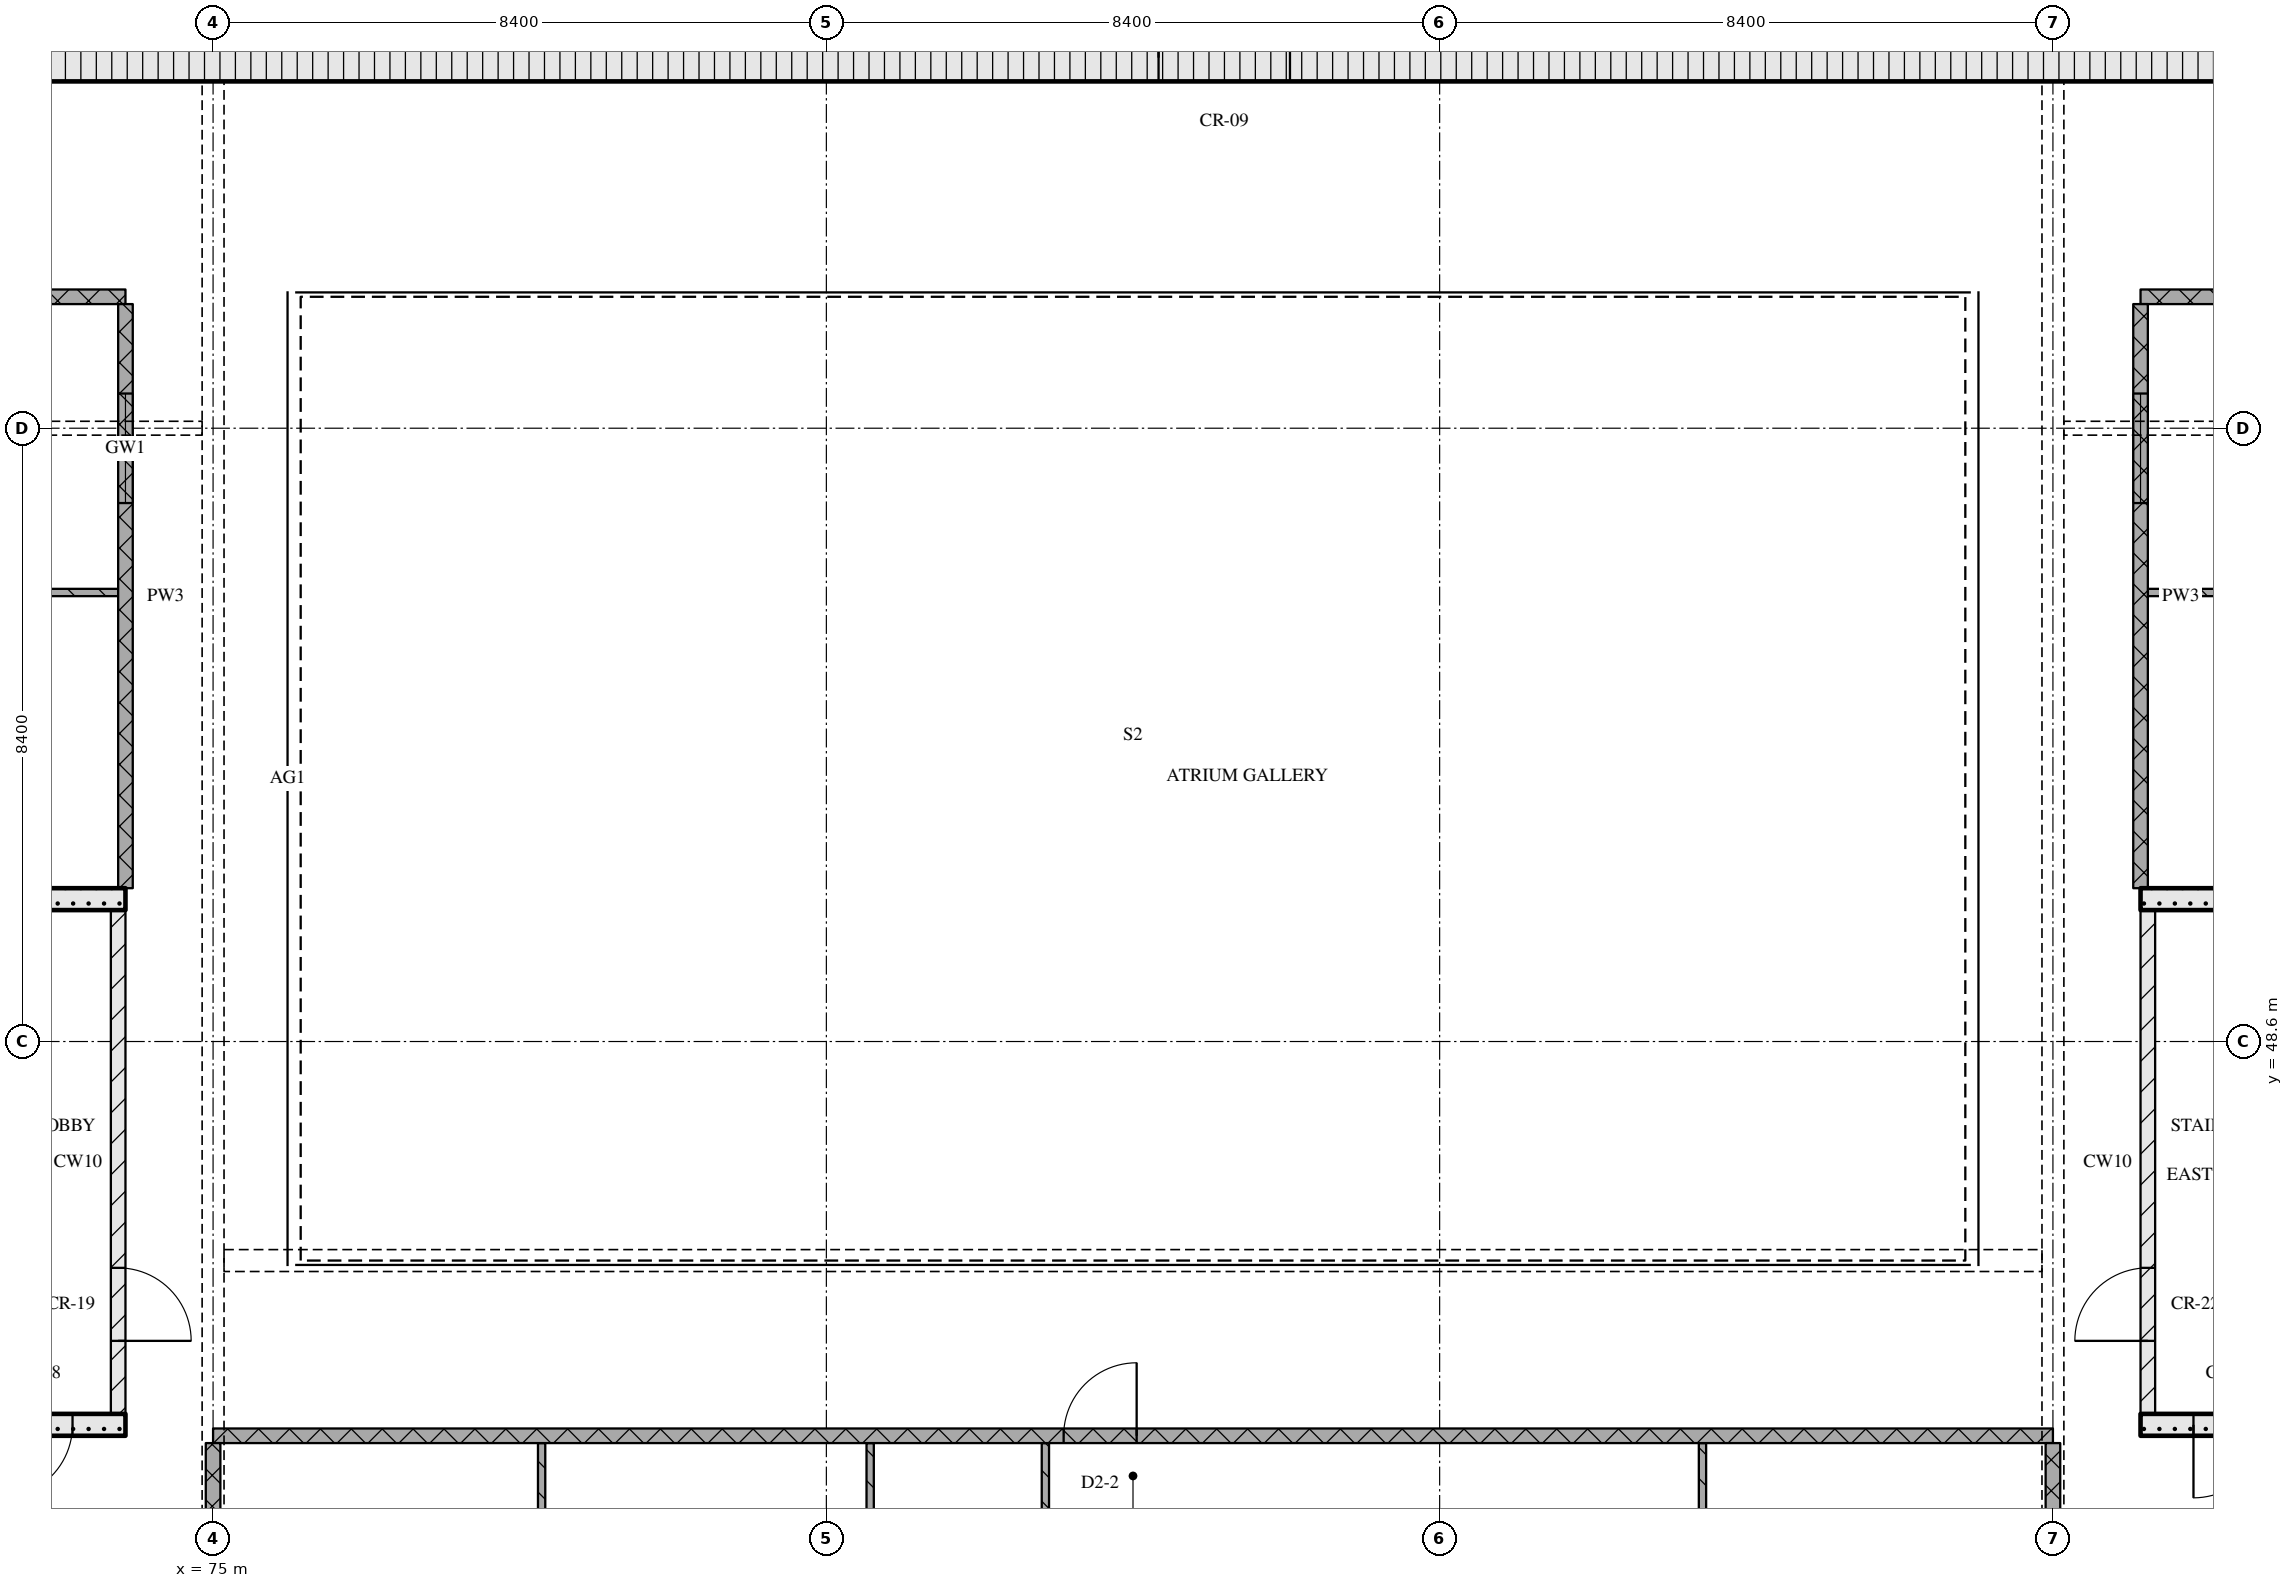
"""IFC4 building model, lengths in metres.
Left out: names, types, materials, properties, quantities, classifications, styles, units other than length and angle.
Written with IfcOpenShell. Run it as: python <this file> out.ifc"""

import sys

from ifc_helpers import new_model, si_unit, direction, frame, frame_2d, origin, place, context, subcontext, project, spatial, rectangle, extrude, element, fill, save


model = new_model("IFC4")
c1 = context("Model", 3, precision=1e-05, world=origin(), true_north=direction((0.0, 1.0)))
c2 = subcontext(c1, "Body", "Model", "MODEL_VIEW")
j1 = project(units=[si_unit("LENGTHUNIT", "METRE"), si_unit("PLANEANGLEUNIT", "RADIAN")], contexts=[c1])
p1 = place(None, origin())
s1 = spatial("IfcSite", under=j1, at=p1, CompositionType="ELEMENT")
p2 = place(p1, origin())
s2 = spatial("IfcBuilding", under=s1, at=p2, CompositionType="ELEMENT")
p3 = place(p2, frame((0.0, 0.0, 219.9)))
s3 = spatial("IfcBuildingStorey", under=s2, at=p3, CompositionType="ELEMENT", Elevation=219.9)
p4 = place(p3, frame((67.15, 62.075, 0.0), z_axis=(0.0, 0.0, 1.0), x_axis=(1.0, 0.0, 0.0)))
e1 = element("IfcWall", 1, at=p4, inside=s3, PredefinedType="SOLIDWALL", context=c2, shape_type="SweptSolid", body=[
    extrude(rectangle(XDim=40.9, YDim=0.65, at=frame_2d((20.45, 0.0))), origin(), (0.0, 0.0, 1.0), 3.32),
])
p5 = place(p4, frame((20.8, 0.0, 0.0)))
e2 = element("IfcOpeningElement", 2, at=p5, cuts=e1, PredefinedType="OPENING", context=c2, shape_type="SweptSolid", body=[
    extrude(rectangle(XDim=1.8, YDim=2.1, at=frame_2d((0.9, 1.05))), frame((0.0, 0.335, 0.0), z_axis=(0.0, -1.0, 0.0), x_axis=(1.0, 0.0, 0.0)), (0.0, 0.0, 1.0), 0.67),
])
p6 = place(p3, frame((68.2, 43.35, 0.0), z_axis=(0.0, 0.0, 1.0), x_axis=(1.0, 0.0, 0.0)))
e3 = element("IfcWall", 3, at=p6, inside=s3, PredefinedType="SOLIDWALL", context=c2, shape_type="SweptSolid", body=[
    extrude(rectangle(XDim=5.6, YDim=0.3, at=frame_2d((2.8, 0.0))), origin(), (0.0, 0.0, 1.0), 3.32),
])
p7 = place(p6, frame((3.875, 0.0, 0.0)))
e4 = element("IfcOpeningElement", 4, at=p7, cuts=e3, PredefinedType="OPENING", context=c2, shape_type="SweptSolid", body=[
    extrude(rectangle(XDim=1.0, YDim=2.1, at=frame_2d((0.5, 1.05))), frame((0.0, 0.16, 0.0), z_axis=(0.0, -1.0, 0.0), x_axis=(1.0, 0.0, 0.0)), (0.0, 0.0, 1.0), 0.32),
])
p8 = place(p3, frame((73.7, 43.5, 0.0), z_axis=(0.0, 0.0, 1.0), x_axis=(0.0, 1.0, 0.0)))
e5 = element("IfcWall", 5, at=p8, inside=s3, PredefinedType="PARTITIONING", context=c2, shape_type="SweptSolid", body=[
    extrude(rectangle(XDim=6.9, YDim=0.2, at=frame_2d((3.45, 0.0))), origin(), (0.0, 0.0, 1.0), 3.32),
])
p9 = place(p8, frame((1.0, 0.0, 0.0)))
e6 = element("IfcOpeningElement", 6, at=p9, cuts=e5, PredefinedType="OPENING", context=c2, shape_type="SweptSolid", body=[
    extrude(rectangle(XDim=1.0, YDim=2.1, at=frame_2d((0.5, 1.05))), frame((0.0, 0.11, 0.0), z_axis=(0.0, -1.0, 0.0), x_axis=(1.0, 0.0, 0.0)), (0.0, 0.0, 1.0), 0.22),
])
p10 = place(p3, frame((68.2, 50.55, 0.0), z_axis=(0.0, 0.0, 1.0), x_axis=(1.0, 0.0, 0.0)))
e7 = element("IfcWall", 7, at=p10, inside=s3, PredefinedType="SOLIDWALL", context=c2, shape_type="SweptSolid", body=[
    extrude(rectangle(XDim=5.6, YDim=0.3, at=frame_2d((2.8, 0.0))), origin(), (0.0, 0.0, 1.0), 3.32),
])
p11 = place(p3, frame((101.4, 43.35, 0.0), z_axis=(0.0, 0.0, 1.0), x_axis=(1.0, 0.0, 0.0)))
e8 = element("IfcWall", 8, at=p11, inside=s3, PredefinedType="SOLIDWALL", context=c2, shape_type="SweptSolid", body=[
    extrude(rectangle(XDim=5.6, YDim=0.3, at=frame_2d((2.8, 0.0))), origin(), (0.0, 0.0, 1.0), 3.32),
])
p12 = place(p11, frame((0.725, 0.0, 0.0)))
e9 = element("IfcOpeningElement", 9, at=p12, cuts=e8, PredefinedType="OPENING", context=c2, shape_type="SweptSolid", body=[
    extrude(rectangle(XDim=1.0, YDim=2.1, at=frame_2d((0.5, 1.05))), frame((0.0, 0.16, 0.0), z_axis=(0.0, -1.0, 0.0), x_axis=(1.0, 0.0, 0.0)), (0.0, 0.0, 1.0), 0.32),
])
p13 = place(p3, frame((101.5, 43.5, 0.0), z_axis=(0.0, 0.0, 1.0), x_axis=(0.0, 1.0, 0.0)))
e10 = element("IfcWall", 10, at=p13, inside=s3, PredefinedType="PARTITIONING", context=c2, shape_type="SweptSolid", body=[
    extrude(rectangle(XDim=6.9, YDim=0.2, at=frame_2d((3.45, 0.0))), origin(), (0.0, 0.0, 1.0), 3.32),
])
p14 = place(p13, frame((1.0, 0.0, 0.0)))
e11 = element("IfcOpeningElement", 11, at=p14, cuts=e10, PredefinedType="OPENING", context=c2, shape_type="SweptSolid", body=[
    extrude(rectangle(XDim=1.0, YDim=2.1, at=frame_2d((0.5, 1.05))), frame((0.0, 0.11, 0.0), z_axis=(0.0, -1.0, 0.0), x_axis=(1.0, 0.0, 0.0)), (0.0, 0.0, 1.0), 0.22),
])
p15 = place(p3, frame((101.4, 50.55, 0.0), z_axis=(0.0, 0.0, 1.0), x_axis=(1.0, 0.0, 0.0)))
e12 = element("IfcWall", 12, at=p15, inside=s3, PredefinedType="SOLIDWALL", context=c2, shape_type="SweptSolid", body=[
    extrude(rectangle(XDim=5.6, YDim=0.3, at=frame_2d((2.8, 0.0))), origin(), (0.0, 0.0, 1.0), 3.32),
])
p16 = place(p3, frame((100.2, 43.2, 0.0), z_axis=(0.0, 0.0, 1.0), x_axis=(-1.0, 0.0, 0.0)))
e13 = element("IfcWall", 13, at=p16, inside=s3, PredefinedType="PARTITIONING", context=c2, shape_type="SweptSolid", body=[
    extrude(rectangle(XDim=25.2, YDim=0.2, at=frame_2d((12.6, 0.0))), origin(), (0.0, 0.0, 1.0), 3.32),
])
p17 = place(p16, frame((12.55, 0.0, 0.0)))
e14 = element("IfcOpeningElement", 14, at=p17, cuts=e13, PredefinedType="OPENING", context=c2, shape_type="SweptSolid", body=[
    extrude(rectangle(XDim=1.0, YDim=2.1, at=frame_2d((0.5, 1.05))), frame((0.0, 0.11, 0.0), z_axis=(0.0, -1.0, 0.0), x_axis=(1.0, 0.0, 0.0)), (0.0, 0.0, 1.0), 0.22),
])
p18 = place(p3, frame((67.5, 54.75, 0.0), z_axis=(0.0, 0.0, 1.0), x_axis=(1.0, 0.0, 0.0)))
e15 = element("IfcWall", 15, at=p18, inside=s3, PredefinedType="PARTITIONING", context=c2, shape_type="SweptSolid", body=[
    extrude(rectangle(XDim=6.2, YDim=0.1, at=frame_2d((3.1, 0.0))), origin(), (0.0, 0.0, 1.0), 3.32),
])
p19 = place(p3, frame((101.5, 54.75, 0.0), z_axis=(0.0, 0.0, 1.0), x_axis=(1.0, 0.0, 0.0)))
e16 = element("IfcWall", 16, at=p19, inside=s3, PredefinedType="PARTITIONING", context=c2, shape_type="SweptSolid", body=[
    extrude(rectangle(XDim=6.8, YDim=0.1, at=frame_2d((3.4, 0.0))), origin(), (0.0, 0.0, 1.0), 3.32),
])
p20 = place(p19, frame((2.9, 0.0, 0.0)))
e17 = element("IfcOpeningElement", 17, at=p20, cuts=e16, PredefinedType="OPENING", context=c2, shape_type="SweptSolid", body=[
    extrude(rectangle(XDim=0.9, YDim=2.1, at=frame_2d((0.45, 1.05))), frame((0.0, 0.06, 0.0), z_axis=(0.0, -1.0, 0.0), x_axis=(1.0, 0.0, 0.0)), (0.0, 0.0, 1.0), 0.12),
])
for number, where, z_axis, x_axis in (
    (18, (63.0, 58.8, 0.0), (0.0, 0.0, 1.0), (1.0, 0.0, 0.0)),
    (19, (101.4, 58.8, 0.0), (0.0, 0.0, 1.0), (1.0, 0.0, 0.0)),
):
    element("IfcWall", number, at=place(p3, frame(where, z_axis=z_axis, x_axis=x_axis)), inside=s3, PredefinedType="PARTITIONING", context=c2, shape_type="SweptSolid", body=[
        extrude(rectangle(XDim=10.8, YDim=0.2, at=frame_2d((5.4, 0.0))), origin(), (0.0, 0.0, 1.0), 3.32),
    ])
p21 = place(p3, frame((73.8, 58.7, 0.0), z_axis=(0.0, 0.0, 1.0), x_axis=(0.0, -1.0, 0.0)))
e20 = element("IfcWall", 20, at=p21, inside=s3, PredefinedType="PARTITIONING", context=c2, shape_type="SweptSolid", body=[
    extrude(rectangle(XDim=8.0, YDim=0.2, at=frame_2d((4.0, 0.0))), origin(), (0.0, 0.0, 1.0), 3.32),
])
p22 = place(p21, frame((1.225, 0.0, 0.9)))
e21 = element("IfcOpeningElement", 21, at=p22, cuts=e20, PredefinedType="OPENING", context=c2, shape_type="SweptSolid", body=[
    extrude(rectangle(XDim=1.5, YDim=1.5, at=frame_2d((0.75, 0.75))), frame((0.0, 0.11, 0.0), z_axis=(0.0, -1.0, 0.0), x_axis=(1.0, 0.0, 0.0)), (0.0, 0.0, 1.0), 0.22),
])
p23 = place(p3, frame((75.0, 43.1, 0.0), z_axis=(0.0, 0.0, 1.0), x_axis=(0.0, -1.0, 0.0)))
e22 = element("IfcWall", 22, at=p23, inside=s3, PredefinedType="PARTITIONING", context=c2, shape_type="SweptSolid", body=[
    extrude(rectangle(XDim=2.2, YDim=0.2, at=frame_2d((1.1, 0.0))), origin(), (0.0, 0.0, 1.0), 2.53),
])
for number, where, z_axis, x_axis in (
    (23, (79.5, 43.1, 0.0), (0.0, 0.0, 1.0), (0.0, -1.0, 0.0)),
    (24, (84.0, 43.1, 0.0), (0.0, 0.0, 1.0), (0.0, -1.0, 0.0)),
    (25, (86.4, 43.1, 0.0), (0.0, 0.0, 1.0), (0.0, -1.0, 0.0)),
    (26, (95.4, 43.1, 0.0), (0.0, 0.0, 1.0), (0.0, -1.0, 0.0)),
):
    element("IfcWall", number, at=place(p3, frame(where, z_axis=z_axis, x_axis=x_axis)), inside=s3, PredefinedType="PARTITIONING", context=c2, shape_type="SweptSolid", body=[
        extrude(rectangle(XDim=4.95, YDim=0.1, at=frame_2d((2.475, 0.0))), origin(), (0.0, 0.0, 1.0), 3.32),
    ])
p24 = place(p3, frame((100.2, 43.1, 0.0), z_axis=(0.0, 0.0, 1.0), x_axis=(0.0, -1.0, 0.0)))
e27 = element("IfcWall", 27, at=p24, inside=s3, PredefinedType="PARTITIONING", context=c2, shape_type="SweptSolid", body=[
    extrude(rectangle(XDim=2.2, YDim=0.2, at=frame_2d((1.1, 0.0))), origin(), (0.0, 0.0, 1.0), 2.53),
])
p25 = place(p3, frame((101.4, 58.7, 0.0), z_axis=(0.0, 0.0, 1.0), x_axis=(0.0, -1.0, 0.0)))
e28 = element("IfcWall", 28, at=p25, inside=s3, PredefinedType="PARTITIONING", context=c2, shape_type="SweptSolid", body=[
    extrude(rectangle(XDim=8.0, YDim=0.2, at=frame_2d((4.0, 0.0))), origin(), (0.0, 0.0, 1.0), 3.32),
])
p26 = place(p25, frame((1.225, 0.0, 0.9)))
e29 = element("IfcOpeningElement", 29, at=p26, cuts=e28, PredefinedType="OPENING", context=c2, shape_type="SweptSolid", body=[
    extrude(rectangle(XDim=1.5, YDim=1.5, at=frame_2d((0.75, 0.75))), frame((0.0, 0.11, 0.0), z_axis=(0.0, -1.0, 0.0), x_axis=(1.0, 0.0, 0.0)), (0.0, 0.0, 1.0), 0.22),
])
p27 = place(p5, origin())
e30 = element("IfcDoor", 30, at=p27, inside=s3, OperationType="DOUBLE_DOOR_SINGLE_SWING", PredefinedType="DOOR", context=c2, shape_type="SweptSolid", body=[
    extrude(rectangle(XDim=1.8, YDim=2.1, at=frame_2d((0.9, 1.05))), frame((0.0, 0.025, 0.0), z_axis=(0.0, -1.0, 0.0), x_axis=(1.0, 0.0, 0.0)), (0.0, 0.0, 1.0), 0.05),
])
fill(e2, e30)
p28 = place(p7, origin())
e31 = element("IfcDoor", 31, at=p28, inside=s3, OperationType="SINGLE_SWING_RIGHT", PredefinedType="DOOR", context=c2, shape_type="SweptSolid", body=[
    extrude(rectangle(XDim=1.0, YDim=2.1, at=frame_2d((0.5, 1.05))), frame((0.0, 0.025, 0.0), z_axis=(0.0, -1.0, 0.0), x_axis=(1.0, 0.0, 0.0)), (0.0, 0.0, 1.0), 0.05),
])
fill(e4, e31)
p29 = place(p9, origin())
e32 = element("IfcDoor", 32, at=p29, inside=s3, OperationType="SINGLE_SWING_RIGHT", PredefinedType="DOOR", context=c2, shape_type="SweptSolid", body=[
    extrude(rectangle(XDim=1.0, YDim=2.1, at=frame_2d((0.5, 1.05))), frame((0.0, 0.025, 0.0), z_axis=(0.0, -1.0, 0.0), x_axis=(1.0, 0.0, 0.0)), (0.0, 0.0, 1.0), 0.05),
])
fill(e6, e32)
p30 = place(p12, origin())
e33 = element("IfcDoor", 33, at=p30, inside=s3, OperationType="SINGLE_SWING_RIGHT", PredefinedType="DOOR", context=c2, shape_type="SweptSolid", body=[
    extrude(rectangle(XDim=1.0, YDim=2.1, at=frame_2d((0.5, 1.05))), frame((0.0, 0.025, 0.0), z_axis=(0.0, -1.0, 0.0), x_axis=(1.0, 0.0, 0.0)), (0.0, 0.0, 1.0), 0.05),
])
fill(e9, e33)
p31 = place(p14, origin())
e34 = element("IfcDoor", 34, at=p31, inside=s3, OperationType="SINGLE_SWING_LEFT", PredefinedType="DOOR", context=c2, shape_type="SweptSolid", body=[
    extrude(rectangle(XDim=1.0, YDim=2.1, at=frame_2d((0.5, 1.05))), frame((0.0, 0.025, 0.0), z_axis=(0.0, -1.0, 0.0), x_axis=(1.0, 0.0, 0.0)), (0.0, 0.0, 1.0), 0.05),
])
fill(e11, e34)
p32 = place(p17, origin())
e35 = element("IfcDoor", 35, at=p32, inside=s3, OperationType="SINGLE_SWING_RIGHT", PredefinedType="DOOR", context=c2, shape_type="SweptSolid", body=[
    extrude(rectangle(XDim=1.0, YDim=2.1, at=frame_2d((0.5, 1.05))), frame((0.0, 0.025, 0.0), z_axis=(0.0, -1.0, 0.0), x_axis=(1.0, 0.0, 0.0)), (0.0, 0.0, 1.0), 0.05),
])
fill(e14, e35)
p33 = place(p22, origin())
e36 = element("IfcWindow", 36, at=p33, inside=s3, PartitioningType="SINGLE_PANEL", PredefinedType="WINDOW", context=c2, shape_type="SweptSolid", body=[
    extrude(rectangle(XDim=1.5, YDim=1.5, at=frame_2d((0.75, 0.75))), frame((0.0, 0.03, 0.0), z_axis=(0.0, -1.0, 0.0), x_axis=(1.0, 0.0, 0.0)), (0.0, 0.0, 1.0), 0.06),
])
fill(e21, e36)
p34 = place(p26, origin())
e37 = element("IfcWindow", 37, at=p34, inside=s3, PartitioningType="SINGLE_PANEL", PredefinedType="WINDOW", context=c2, shape_type="SweptSolid", body=[
    extrude(rectangle(XDim=1.5, YDim=1.5, at=frame_2d((0.75, 0.75))), frame((0.0, 0.03, 0.0), z_axis=(0.0, -1.0, 0.0), x_axis=(1.0, 0.0, 0.0)), (0.0, 0.0, 1.0), 0.06),
])
fill(e29, e37)
save(model, sys.argv[1])
